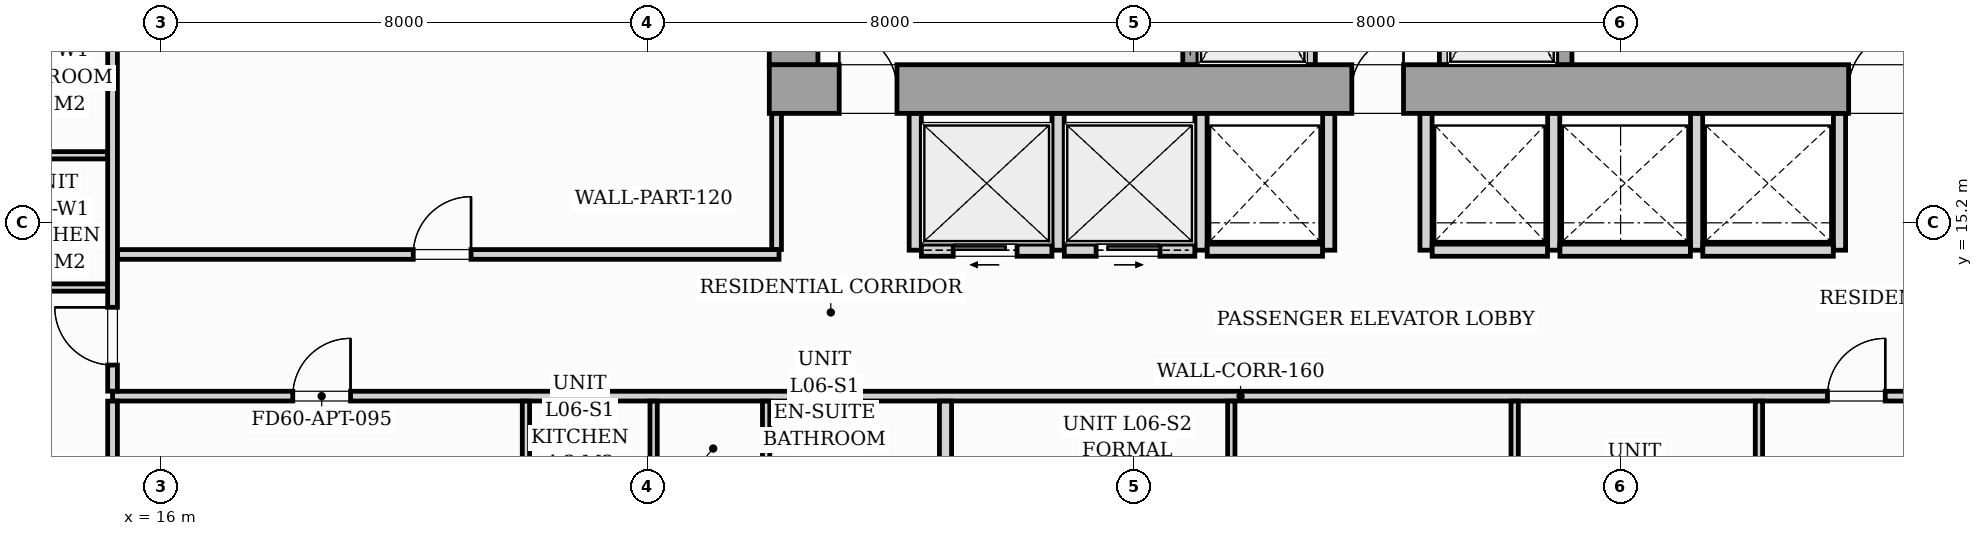
"""IFC4 building model, lengths in metres.
Left out: names, types, materials, properties, quantities, classifications, styles, units other than length and angle.
Written with IfcOpenShell. Run it as: python <this file> out.ifc"""

import sys

from ifc_helpers import new_model, si_unit, direction, frame, frame_2d, origin, origin_2d, place, context, subcontext, project, spatial, rectangle, i_section, extrude, source, transform, mapped, element, fill, save


model = new_model("IFC4")
c1 = context("Model", 3, precision=1e-05, world=origin(), true_north=direction((0.0, 1.0)))
c2 = subcontext(c1, "Body", "Model", "MODEL_VIEW")
j1 = project(units=[si_unit("LENGTHUNIT", "METRE"), si_unit("PLANEANGLEUNIT", "RADIAN")], contexts=[c1])
p1 = place(None, origin())
s1 = spatial("IfcSite", under=j1, at=p1, CompositionType="ELEMENT")
p2 = place(p1, origin())
s2 = spatial("IfcBuilding", under=s1, at=p2, CompositionType="ELEMENT")
p3 = place(p2, frame((0.0, 0.0, 26.2)))
s3 = spatial("IfcBuildingStorey", under=s2, at=p3, CompositionType="ELEMENT", Elevation=26.2)
m1 = source(origin(), c2, "Body", "SweptSolid", [
    extrude(i_section(OverallWidth=0.437, OverallDepth=0.514, WebThickness=0.061, FlangeThickness=0.097, FilletRadius=0.018, at=origin_2d()), origin(), (0.0, 0.0, 1.0), 3.196),
])
for number, where, z_axis, x_axis in (
    (1, (26.4, 17.4, 0.002), (0.0, 0.0, 1.0), (1.0, 0.0, 0.0)),
    (2, (33.12, 17.4, 0.002), (0.0, 0.0, 1.0), (1.0, 0.0, 0.0)),
    (3, (38.88, 17.4, 0.002), (0.0, 0.0, 1.0), (1.0, 0.0, 0.0)),
):
    element("IfcColumn", number, at=place(p3, frame(where, z_axis=z_axis, x_axis=x_axis)), inside=s3, PredefinedType="PILASTER", context=c2, shape_type="MappedRepresentation", body=[
        mapped(m1, transform((0.0, 0.0, 0.0), scale=1.0)),
    ])
p4 = place(p3, frame((26.0, 17.4, 0.0), z_axis=(0.0, 0.0, 1.0), x_axis=(1.0, 0.0, 0.0)))
e4 = element("IfcWall", 4, at=p4, inside=s3, PredefinedType="SHEAR", context=c2, shape_type="SweptSolid", body=[
    extrude(rectangle(XDim=20.0, YDim=0.8, at=frame_2d((10.0, 0.0))), origin(), (0.0, 0.0, 1.0), 3.2),
])
p5 = place(p4, frame((1.15, 0.0, 0.0)))
e5 = element("IfcOpeningElement", 5, at=p5, cuts=e4, PredefinedType="OPENING", context=c2, shape_type="SweptSolid", body=[
    extrude(rectangle(XDim=0.95, YDim=2.06, at=frame_2d((0.475, 1.03))), frame((0.0, 0.41, 0.0), z_axis=(0.0, -1.0, 0.0), x_axis=(1.0, 0.0, 0.0)), (0.0, 0.0, 1.0), 0.82),
])
p6 = place(p4, frame((9.58, 0.0, 0.0)))
e6 = element("IfcOpeningElement", 6, at=p6, cuts=e4, PredefinedType="OPENING", context=c2, shape_type="SweptSolid", body=[
    extrude(rectangle(XDim=0.85, YDim=2.0, at=frame_2d((0.425, 1.0))), frame((0.0, 0.41, 0.0), z_axis=(0.0, -1.0, 0.0), x_axis=(1.0, 0.0, 0.0)), (0.0, 0.0, 1.0), 0.82),
])
p7 = place(p4, frame((17.75, 0.0, 0.0)))
e7 = element("IfcOpeningElement", 7, at=p7, cuts=e4, PredefinedType="OPENING", context=c2, shape_type="SweptSolid", body=[
    extrude(rectangle(XDim=0.95, YDim=2.06, at=frame_2d((0.475, 1.03))), frame((0.0, 0.41, 0.0), z_axis=(0.0, -1.0, 0.0), x_axis=(1.0, 0.0, 0.0)), (0.0, 0.0, 1.0), 0.82),
])
p8 = place(p3, frame((26.4, 17.802, 0.0), z_axis=(0.0, 0.0, 1.0), x_axis=(0.0, 1.0, 0.0)))
e8 = element("IfcWall", 8, at=p8, inside=s3, PredefinedType="SHEAR", context=c2, shape_type="SweptSolid", body=[
    extrude(rectangle(XDim=5.796, YDim=0.8, at=frame_2d((2.898, 0.0))), origin(), (0.0, 0.0, 1.0), 3.2),
])
p9 = place(p3, frame((32.925, 17.802, 0.0), z_axis=(0.0, 0.0, 1.0), x_axis=(0.0, 1.0, 0.0)))
e9 = element("IfcWall", 9, at=p9, inside=s3, PredefinedType="SOLIDWALL", context=c2, shape_type="SweptSolid", body=[
    extrude(rectangle(XDim=2.646, YDim=0.25, at=frame_2d((1.323, 0.0))), origin(), (0.0, 0.0, 1.0), 3.2),
])
p10 = place(p9, frame((0.648, 0.0, 0.0)))
e10 = element("IfcOpeningElement", 10, at=p10, cuts=e9, PredefinedType="OPENING", context=c2, shape_type="SweptSolid", body=[
    extrude(rectangle(XDim=1.1, YDim=2.08, at=frame_2d((0.55, 1.04))), frame((0.0, 0.135, 0.0), z_axis=(0.0, -1.0, 0.0), x_axis=(1.0, 0.0, 0.0)), (0.0, 0.0, 1.0), 0.27),
])
for number, where, z_axis, x_axis in (
    (11, (34.9, 17.802, 0.0), (0.0, 0.0, 1.0), (0.0, 1.0, 0.0)),
    (12, (37.1, 17.802, 0.0), (0.0, 0.0, 1.0), (0.0, 1.0, 0.0)),
):
    element("IfcWall", number, at=place(p3, frame(where, z_axis=z_axis, x_axis=x_axis)), inside=s3, PredefinedType="PARTITIONING", context=c2, shape_type="SweptSolid", body=[
        extrude(rectangle(XDim=2.646, YDim=0.16, at=frame_2d((1.323, 0.0))), origin(), (0.0, 0.0, 1.0), 2.94),
    ])
p11 = place(p3, frame((39.075, 17.802, 0.0), z_axis=(0.0, 0.0, 1.0), x_axis=(0.0, 1.0, 0.0)))
e13 = element("IfcWall", 13, at=p11, inside=s3, PredefinedType="SOLIDWALL", context=c2, shape_type="SweptSolid", body=[
    extrude(rectangle(XDim=2.646, YDim=0.25, at=frame_2d((1.323, 0.0))), origin(), (0.0, 0.0, 1.0), 3.2),
])
p12 = place(p11, frame((0.648, 0.0, 0.0)))
e14 = element("IfcOpeningElement", 14, at=p12, cuts=e13, PredefinedType="OPENING", context=c2, shape_type="SweptSolid", body=[
    extrude(rectangle(XDim=1.1, YDim=2.08, at=frame_2d((0.55, 1.04))), frame((0.0, 0.135, 0.0), z_axis=(0.0, -1.0, 0.0), x_axis=(1.0, 0.0, 0.0)), (0.0, 0.0, 1.0), 0.27),
])
for number, where, z_axis, x_axis in (
    (15, (28.4, 14.75, 0.0), (0.0, 0.0, 1.0), (0.0, 1.0, 0.0)),
    (16, (30.75, 14.75, 0.0), (0.0, 0.0, 1.0), (0.0, 1.0, 0.0)),
    (17, (33.1, 14.75, 0.0), (0.0, 0.0, 1.0), (0.0, 1.0, 0.0)),
):
    element("IfcWall", number, at=place(p3, frame(where, z_axis=z_axis, x_axis=x_axis)), inside=s3, PredefinedType="PARTITIONING", context=c2, shape_type="SweptSolid", body=[
        extrude(rectangle(XDim=2.248, YDim=0.2, at=frame_2d((1.124, 0.0))), origin(), (0.0, 0.0, 1.0), 2.94),
    ])
p13 = place(p3, frame((28.502, 14.75, 0.0), z_axis=(0.0, 0.0, 1.0), x_axis=(1.0, 0.0, 0.0)))
e18 = element("IfcWall", 18, at=p13, inside=s3, PredefinedType="PARTITIONING", context=c2, shape_type="SweptSolid", body=[
    extrude(rectangle(XDim=2.146, YDim=0.2, at=frame_2d((1.073, 0.0))), origin(), (0.0, 0.0, 1.0), 2.94),
])
p14 = place(p13, frame((0.523, 0.0, 0.0)))
e19 = element("IfcOpeningElement", 19, at=p14, cuts=e18, PredefinedType="OPENING", context=c2, shape_type="SweptSolid", body=[
    extrude(rectangle(XDim=1.05, YDim=2.08, at=frame_2d((0.525, 1.04))), frame((0.0, 0.11, 0.0), z_axis=(0.0, -1.0, 0.0), x_axis=(1.0, 0.0, 0.0)), (0.0, 0.0, 1.0), 0.22),
])
p15 = place(p3, frame((30.852, 14.75, 0.0), z_axis=(0.0, 0.0, 1.0), x_axis=(1.0, 0.0, 0.0)))
e20 = element("IfcWall", 20, at=p15, inside=s3, PredefinedType="PARTITIONING", context=c2, shape_type="SweptSolid", body=[
    extrude(rectangle(XDim=2.146, YDim=0.2, at=frame_2d((1.073, 0.0))), origin(), (0.0, 0.0, 1.0), 2.94),
])
p16 = place(p15, frame((0.523, 0.0, 0.0)))
e21 = element("IfcOpeningElement", 21, at=p16, cuts=e20, PredefinedType="OPENING", context=c2, shape_type="SweptSolid", body=[
    extrude(rectangle(XDim=1.05, YDim=2.08, at=frame_2d((0.525, 1.04))), frame((0.0, 0.11, 0.0), z_axis=(0.0, -1.0, 0.0), x_axis=(1.0, 0.0, 0.0)), (0.0, 0.0, 1.0), 0.22),
])
p17 = place(p3, frame((35.2, 14.75, 0.0), z_axis=(0.0, 0.0, 1.0), x_axis=(0.0, 1.0, 0.0)))
e22 = element("IfcWall", 22, at=p17, inside=s3, PredefinedType="PARTITIONING", context=c2, shape_type="SweptSolid", body=[
    extrude(rectangle(XDim=2.248, YDim=0.2, at=frame_2d((1.124, 0.0))), origin(), (0.0, 0.0, 1.0), 2.94),
])
p18 = place(p3, frame((33.202, 14.75, 0.0), z_axis=(0.0, 0.0, 1.0), x_axis=(1.0, 0.0, 0.0)))
e23 = element("IfcWall", 23, at=p18, inside=s3, PredefinedType="PARTITIONING", context=c2, shape_type="SweptSolid", body=[
    extrude(rectangle(XDim=1.896, YDim=0.2, at=frame_2d((0.948, 0.0))), origin(), (0.0, 0.0, 1.0), 2.94),
])
for number, where, z_axis, x_axis in (
    (24, (36.8, 14.75, 0.0), (0.0, 0.0, 1.0), (0.0, 1.0, 0.0)),
    (25, (38.9, 14.75, 0.0), (0.0, 0.0, 1.0), (0.0, 1.0, 0.0)),
):
    element("IfcWall", number, at=place(p3, frame(where, z_axis=z_axis, x_axis=x_axis)), inside=s3, PredefinedType="PARTITIONING", context=c2, shape_type="SweptSolid", body=[
        extrude(rectangle(XDim=2.248, YDim=0.2, at=frame_2d((1.124, 0.0))), origin(), (0.0, 0.0, 1.0), 2.94),
    ])
p19 = place(p3, frame((36.902, 14.75, 0.0), z_axis=(0.0, 0.0, 1.0), x_axis=(1.0, 0.0, 0.0)))
e26 = element("IfcWall", 26, at=p19, inside=s3, PredefinedType="PARTITIONING", context=c2, shape_type="SweptSolid", body=[
    extrude(rectangle(XDim=1.896, YDim=0.2, at=frame_2d((0.948, 0.0))), origin(), (0.0, 0.0, 1.0), 2.94),
])
for number, where, z_axis, x_axis in (
    (27, (41.25, 14.75, 0.0), (0.0, 0.0, 1.0), (0.0, 1.0, 0.0)),
    (28, (43.6, 14.75, 0.0), (0.0, 0.0, 1.0), (0.0, 1.0, 0.0)),
):
    element("IfcWall", number, at=place(p3, frame(where, z_axis=z_axis, x_axis=x_axis)), inside=s3, PredefinedType="PARTITIONING", context=c2, shape_type="SweptSolid", body=[
        extrude(rectangle(XDim=2.248, YDim=0.2, at=frame_2d((1.124, 0.0))), origin(), (0.0, 0.0, 1.0), 2.94),
    ])
for number, where, z_axis, x_axis in (
    (29, (39.002, 14.75, 0.0), (0.0, 0.0, 1.0), (1.0, 0.0, 0.0)),
    (30, (41.352, 14.75, 0.0), (0.0, 0.0, 1.0), (1.0, 0.0, 0.0)),
):
    element("IfcWall", number, at=place(p3, frame(where, z_axis=z_axis, x_axis=x_axis)), inside=s3, PredefinedType="PARTITIONING", context=c2, shape_type="SweptSolid", body=[
        extrude(rectangle(XDim=2.146, YDim=0.2, at=frame_2d((1.073, 0.0))), origin(), (0.0, 0.0, 1.0), 2.94),
    ])
p20 = place(p3, frame((15.2, 12.35, 0.0), z_axis=(0.0, 0.0, 1.0), x_axis=(1.0, 0.0, 0.0)))
e31 = element("IfcWall", 31, at=p20, inside=s3, PredefinedType="PARTITIONING", context=c2, shape_type="SweptSolid", body=[
    extrude(rectangle(XDim=37.1, YDim=0.16, at=frame_2d((18.55, 0.0))), origin(), (0.0, 0.0, 1.0), 2.94),
])
p21 = place(p20, frame((2.964, 0.0, 0.0)))
e32 = element("IfcOpeningElement", 32, at=p21, cuts=e31, PredefinedType="OPENING", context=c2, shape_type="SweptSolid", body=[
    extrude(rectangle(XDim=0.95, YDim=2.06, at=frame_2d((0.475, 1.03))), frame((0.0, 0.09, 0.0), z_axis=(0.0, -1.0, 0.0), x_axis=(1.0, 0.0, 0.0)), (0.0, 0.0, 1.0), 0.18),
])
p22 = place(p20, frame((28.202, 0.0, 0.0)))
e33 = element("IfcOpeningElement", 33, at=p22, cuts=e31, PredefinedType="OPENING", context=c2, shape_type="SweptSolid", body=[
    extrude(rectangle(XDim=0.95, YDim=2.06, at=frame_2d((0.475, 1.03))), frame((0.0, 0.09, 0.0), z_axis=(0.0, -1.0, 0.0), x_axis=(1.0, 0.0, 0.0)), (0.0, 0.0, 1.0), 0.18),
])
p23 = place(p3, frame((15.2, 2.962, 0.0), z_axis=(0.0, 0.0, 1.0), x_axis=(0.0, 1.0, 0.0)))
e34 = element("IfcWall", 34, at=p23, inside=s3, PredefinedType="PARTITIONING", context=c2, shape_type="SweptSolid", body=[
    extrude(rectangle(XDim=9.306, YDim=0.16, at=frame_2d((4.653, 0.0))), origin(), (0.0, 0.0, 1.0), 2.94),
])
p24 = place(p3, frame((15.2, 12.432, 0.0), z_axis=(0.0, 0.0, 1.0), x_axis=(0.0, 1.0, 0.0)))
e35 = element("IfcWall", 35, at=p24, inside=s3, PredefinedType="PARTITIONING", context=c2, shape_type="SweptSolid", body=[
    extrude(rectangle(XDim=15.006, YDim=0.16, at=frame_2d((7.503, 0.0))), origin(), (0.0, 0.0, 1.0), 2.94),
])
p25 = place(p24, frame((0.429, 0.0, 0.0)))
e36 = element("IfcOpeningElement", 36, at=p25, cuts=e35, PredefinedType="OPENING", context=c2, shape_type="SweptSolid", body=[
    extrude(rectangle(XDim=0.95, YDim=2.06, at=frame_2d((0.475, 1.03))), frame((0.0, 0.09, 0.0), z_axis=(0.0, -1.0, 0.0), x_axis=(1.0, 0.0, 0.0)), (0.0, 0.0, 1.0), 0.18),
])
p26 = place(p3, frame((25.948, 2.78, 0.0), z_axis=(0.0, 0.0, 1.0), x_axis=(0.0, 1.0, 0.0)))
e37 = element("IfcWall", 37, at=p26, inside=s3, PredefinedType="PARTITIONING", context=c2, shape_type="SweptSolid", body=[
    extrude(rectangle(XDim=9.488, YDim=0.12, at=frame_2d((4.744, 0.0))), origin(), (0.0, 0.0, 1.0), 2.94),
])
p27 = place(p26, frame((6.22, 0.0, 0.0)))
e38 = element("IfcOpeningElement", 38, at=p27, cuts=e37, PredefinedType="OPENING", context=c2, shape_type="SweptSolid", body=[
    extrude(rectangle(XDim=0.9, YDim=2.05, at=frame_2d((0.45, 1.025))), frame((0.0, 0.07, 0.0), z_axis=(0.0, -1.0, 0.0), x_axis=(1.0, 0.0, 0.0)), (0.0, 0.0, 1.0), 0.14),
])
for number, where, z_axis, x_axis in (
    (39, (24.098, 10.162, 0.0), (0.0, 0.0, 1.0), (0.0, 1.0, 0.0)),
    (40, (21.998, 10.162, 0.0), (0.0, 0.0, 1.0), (0.0, 1.0, 0.0)),
):
    element("IfcWall", number, at=place(p3, frame(where, z_axis=z_axis, x_axis=x_axis)), inside=s3, PredefinedType="PARTITIONING", context=c2, shape_type="SweptSolid", body=[
        extrude(rectangle(XDim=2.106, YDim=0.12, at=frame_2d((1.053, 0.0))), origin(), (0.0, 0.0, 1.0), 2.94),
    ])
p28 = place(p3, frame((28.898, 10.112, 0.0), z_axis=(0.0, 0.0, 1.0), x_axis=(0.0, 1.0, 0.0)))
e41 = element("IfcWall", 41, at=p28, inside=s3, PredefinedType="PARTITIONING", context=c2, shape_type="SweptSolid", body=[
    extrude(rectangle(XDim=2.156, YDim=0.2, at=frame_2d((1.078, 0.0))), origin(), (0.0, 0.0, 1.0), 2.94),
])
p29 = place(p3, frame((33.598, 2.78, 0.0), z_axis=(0.0, 0.0, 1.0), x_axis=(0.0, 1.0, 0.0)))
e42 = element("IfcWall", 42, at=p29, inside=s3, PredefinedType="PARTITIONING", context=c2, shape_type="SweptSolid", body=[
    extrude(rectangle(XDim=9.488, YDim=0.12, at=frame_2d((4.744, 0.0))), origin(), (0.0, 0.0, 1.0), 2.94),
])
p30 = place(p29, frame((4.4, 0.0, 0.0)))
e43 = element("IfcOpeningElement", 43, at=p30, cuts=e42, PredefinedType="OPENING", context=c2, shape_type="SweptSolid", body=[
    extrude(rectangle(XDim=0.85, YDim=2.05, at=frame_2d((0.425, 1.025))), frame((0.0, 0.07, 0.0), z_axis=(0.0, -1.0, 0.0), x_axis=(1.0, 0.0, 0.0)), (0.0, 0.0, 1.0), 0.14),
])
p31 = place(p3, frame((38.258, 2.78, 0.0), z_axis=(0.0, 0.0, 1.0), x_axis=(0.0, 1.0, 0.0)))
e44 = element("IfcWall", 44, at=p31, inside=s3, PredefinedType="PARTITIONING", context=c2, shape_type="SweptSolid", body=[
    extrude(rectangle(XDim=9.488, YDim=0.12, at=frame_2d((4.744, 0.0))), origin(), (0.0, 0.0, 1.0), 2.94),
])
p32 = place(p31, frame((4.4, 0.0, 0.0)))
e45 = element("IfcOpeningElement", 45, at=p32, cuts=e44, PredefinedType="OPENING", context=c2, shape_type="SweptSolid", body=[
    extrude(rectangle(XDim=0.85, YDim=2.05, at=frame_2d((0.425, 1.025))), frame((0.0, 0.07, 0.0), z_axis=(0.0, -1.0, 0.0), x_axis=(1.0, 0.0, 0.0)), (0.0, 0.0, 1.0), 0.14),
])
p33 = place(p3, frame((42.275, 2.962, 0.0), z_axis=(0.0, 0.0, 1.0), x_axis=(0.0, 1.0, 0.0)))
e46 = element("IfcWall", 46, at=p33, inside=s3, PredefinedType="PARTITIONING", context=c2, shape_type="SweptSolid", body=[
    extrude(rectangle(XDim=9.306, YDim=0.12, at=frame_2d((4.653, 0.0))), origin(), (0.0, 0.0, 1.0), 2.94),
])
p34 = place(p33, frame((4.218, 0.0, 0.0)))
e47 = element("IfcOpeningElement", 47, at=p34, cuts=e46, PredefinedType="OPENING", context=c2, shape_type="SweptSolid", body=[
    extrude(rectangle(XDim=0.85, YDim=2.05, at=frame_2d((0.425, 1.025))), frame((0.0, 0.07, 0.0), z_axis=(0.0, -1.0, 0.0), x_axis=(1.0, 0.0, 0.0)), (0.0, 0.0, 1.0), 0.14),
])
p35 = place(p3, frame((12.862, 16.311, 0.0), z_axis=(0.0, 0.0, 1.0), x_axis=(1.0, 0.0, 0.0)))
e48 = element("IfcWall", 48, at=p35, inside=s3, PredefinedType="PARTITIONING", context=c2, shape_type="SweptSolid", body=[
    extrude(rectangle(XDim=2.256, YDim=0.12, at=frame_2d((1.128, 0.0))), origin(), (0.0, 0.0, 1.0), 2.045),
])
p36 = place(p3, frame((12.862, 14.136, 0.0), z_axis=(0.0, 0.0, 1.0), x_axis=(1.0, 0.0, 0.0)))
e49 = element("IfcWall", 49, at=p36, inside=s3, PredefinedType="PARTITIONING", context=c2, shape_type="SweptSolid", body=[
    extrude(rectangle(XDim=2.256, YDim=0.12, at=frame_2d((1.128, 0.0))), origin(), (0.0, 0.0, 1.0), 2.94),
])
p37 = place(p3, frame((15.282, 14.68, 0.0), z_axis=(0.0, 0.0, 1.0), x_axis=(1.0, 0.0, 0.0)))
e50 = element("IfcWall", 50, at=p37, inside=s3, PredefinedType="PARTITIONING", context=c2, shape_type="SweptSolid", body=[
    extrude(rectangle(XDim=10.878, YDim=0.16, at=frame_2d((5.439, 0.0))), origin(), (0.0, 0.0, 1.0), 2.94),
])
p38 = place(p37, frame((4.863, 0.0, 0.0)))
e51 = element("IfcOpeningElement", 51, at=p38, cuts=e50, PredefinedType="OPENING", context=c2, shape_type="SweptSolid", body=[
    extrude(rectangle(XDim=0.95, YDim=2.06, at=frame_2d((0.475, 1.03))), frame((0.0, 0.09, 0.0), z_axis=(0.0, -1.0, 0.0), x_axis=(1.0, 0.0, 0.0)), (0.0, 0.0, 1.0), 0.18),
])
p39 = place(p3, frame((26.12, 14.762, 0.0), z_axis=(0.0, 0.0, 1.0), x_axis=(0.0, 1.0, 0.0)))
e52 = element("IfcWall", 52, at=p39, inside=s3, PredefinedType="PARTITIONING", context=c2, shape_type="SweptSolid", body=[
    extrude(rectangle(XDim=2.236, YDim=0.16, at=frame_2d((1.118, 0.0))), origin(), (0.0, 0.0, 1.0), 2.94),
])
m2 = source(origin(), c2, "Body", "SweptSolid", [
    extrude(rectangle(XDim=0.95, YDim=2.06, at=frame_2d((0.475, 1.03))), frame((0.0, 0.025, 0.0), z_axis=(0.0, -1.0, 0.0), x_axis=(1.0, 0.0, 0.0)), (0.0, 0.0, 1.0), 0.05),
])
p40 = place(p5, origin())
e53 = element("IfcDoor", 53, at=p40, inside=s3, OperationType="SINGLE_SWING_LEFT", PredefinedType="DOOR", context=c2, shape_type="MappedRepresentation", body=[
    mapped(m2, transform((0.0, 0.0, 0.0), scale=1.0)),
])
fill(e5, e53)
m3 = source(origin(), c2, "Body", "SweptSolid", [
    extrude(rectangle(XDim=0.85, YDim=2.0, at=frame_2d((0.425, 1.0))), frame((0.0, 0.025, 0.0), z_axis=(0.0, -1.0, 0.0), x_axis=(1.0, 0.0, 0.0)), (0.0, 0.0, 1.0), 0.05),
])
p41 = place(p6, origin())
e54 = element("IfcDoor", 54, at=p41, inside=s3, OperationType="SINGLE_SWING_RIGHT", PredefinedType="DOOR", context=c2, shape_type="MappedRepresentation", body=[
    mapped(m3, transform((0.0, 0.0, 0.0), scale=1.0)),
])
fill(e6, e54)
p42 = place(p7, origin())
e55 = element("IfcDoor", 55, at=p42, inside=s3, OperationType="SINGLE_SWING_RIGHT", PredefinedType="DOOR", context=c2, shape_type="MappedRepresentation", body=[
    mapped(m2, transform((0.0, 0.0, 0.0), scale=1.0)),
])
fill(e7, e55)
m4 = source(origin(), c2, "Body", "SweptSolid", [
    extrude(rectangle(XDim=1.05, YDim=2.08, at=frame_2d((0.525, 1.04))), frame((0.0, 0.025, 0.0), z_axis=(0.0, -1.0, 0.0), x_axis=(1.0, 0.0, 0.0)), (0.0, 0.0, 1.0), 0.05),
])
p43 = place(p14, origin())
e56 = element("IfcDoor", 56, at=p43, inside=s3, OperationType="SLIDING_TO_LEFT", PredefinedType="DOOR", context=c2, shape_type="MappedRepresentation", body=[
    mapped(m4, transform((0.0, 0.0, 0.0), scale=1.0)),
])
fill(e19, e56)
p44 = place(p16, origin())
e57 = element("IfcDoor", 57, at=p44, inside=s3, OperationType="SLIDING_TO_RIGHT", PredefinedType="DOOR", context=c2, shape_type="MappedRepresentation", body=[
    mapped(m4, transform((0.0, 0.0, 0.0), scale=1.0)),
])
fill(e21, e57)
m5 = source(origin(), c2, "Body", "SweptSolid", [
    extrude(rectangle(XDim=0.95, YDim=2.06, at=frame_2d((0.475, 1.03))), frame((0.0, 0.025, 0.0), z_axis=(0.0, -1.0, 0.0), x_axis=(1.0, 0.0, 0.0)), (0.0, 0.0, 1.0), 0.05),
])
p45 = place(p21, origin())
e58 = element("IfcDoor", 58, at=p45, inside=s3, OperationType="SINGLE_SWING_RIGHT", PredefinedType="DOOR", context=c2, shape_type="MappedRepresentation", body=[
    mapped(m5, transform((0.0, 0.0, 0.0), scale=1.0)),
])
fill(e32, e58)
p46 = place(p22, origin())
e59 = element("IfcDoor", 59, at=p46, inside=s3, OperationType="SINGLE_SWING_RIGHT", PredefinedType="DOOR", context=c2, shape_type="MappedRepresentation", body=[
    mapped(m5, transform((0.0, 0.0, 0.0), scale=1.0)),
])
fill(e33, e59)
p47 = place(p25, origin())
e60 = element("IfcDoor", 60, at=p47, inside=s3, OperationType="SINGLE_SWING_RIGHT", PredefinedType="DOOR", context=c2, shape_type="MappedRepresentation", body=[
    mapped(m5, transform((0.0, 0.0, 0.0), scale=1.0)),
])
fill(e36, e60)
p48 = place(p38, origin())
e61 = element("IfcDoor", 61, at=p48, inside=s3, OperationType="SINGLE_SWING_RIGHT", PredefinedType="DOOR", context=c2, shape_type="MappedRepresentation", body=[
    mapped(m5, transform((0.0, 0.0, 0.0), scale=1.0)),
])
fill(e51, e61)
save(model, sys.argv[1])
